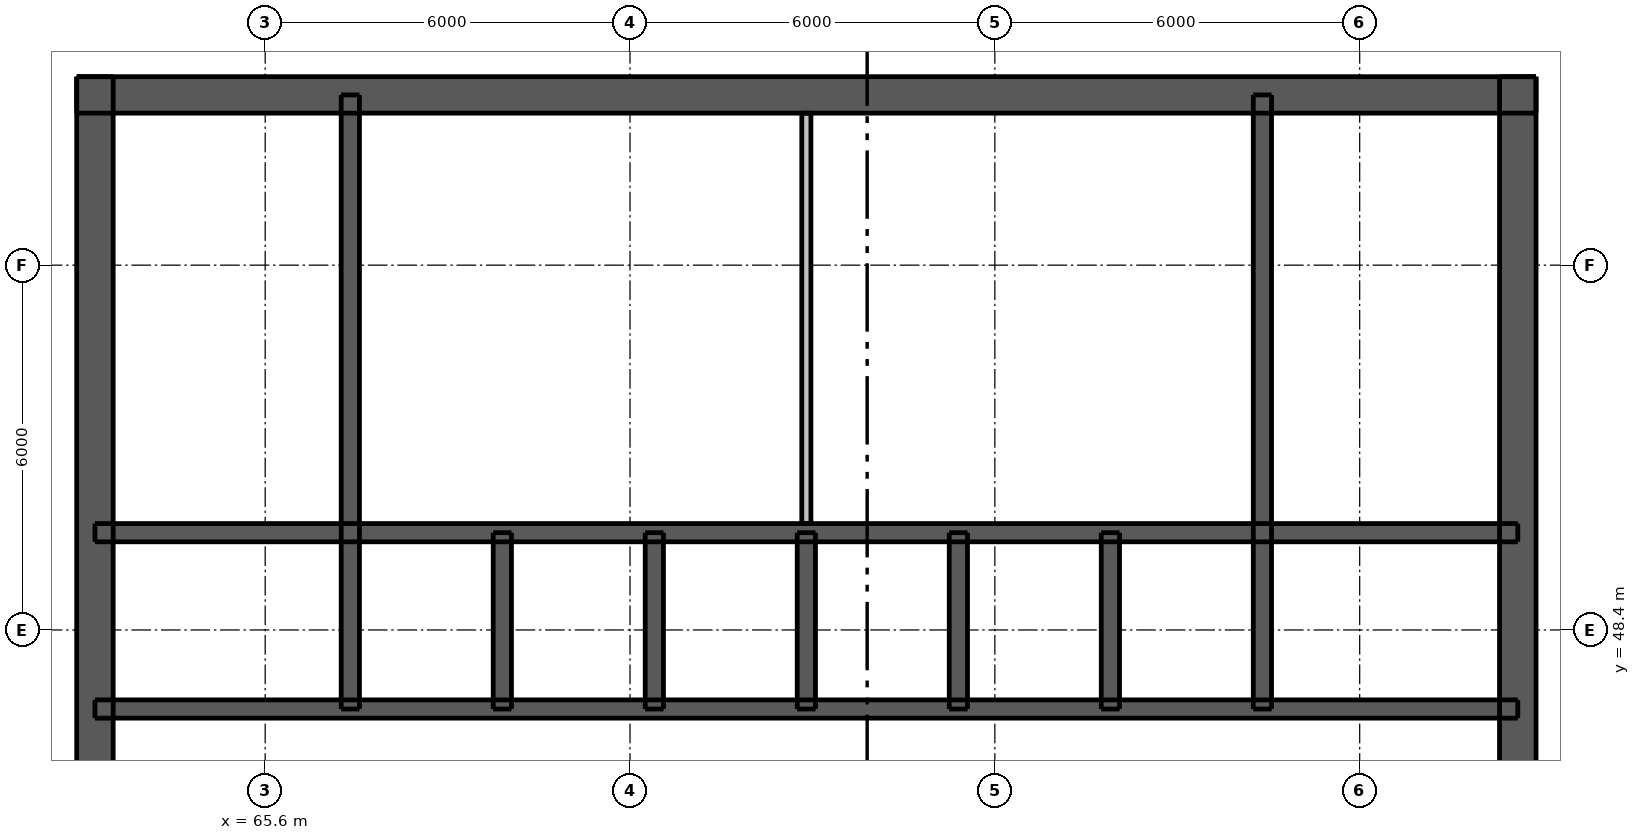
"""IFC4 building model, lengths in metres.
Left out: names, types, materials, properties, quantities, classifications, styles, units other than length and angle.
Written with IfcOpenShell. Run it as: python <this file> out.ifc"""

import sys

from ifc_helpers import new_model, si_unit, direction, frame, frame_2d, origin, place, context, subcontext, project, spatial, rectangle, extrude, element, fill, save


model = new_model("IFC4")
c1 = context("Model", 3, precision=1e-05, world=origin(), true_north=direction((0.0, 1.0)))
c2 = subcontext(c1, "Body", "Model", "MODEL_VIEW")
j1 = project(units=[si_unit("LENGTHUNIT", "METRE"), si_unit("PLANEANGLEUNIT", "RADIAN")], contexts=[c1])
p1 = place(None, origin())
s1 = spatial("IfcSite", under=j1, at=p1, CompositionType="ELEMENT")
p2 = place(p1, origin())
s2 = spatial("IfcBuilding", under=s1, at=p2, CompositionType="ELEMENT")
p3 = place(p2, frame((0.0, 0.0, 206.8)))
s3 = spatial("IfcBuildingStorey", under=s2, at=p3, CompositionType="ELEMENT", Elevation=206.8)
p4 = place(p3, frame((62.5, 57.2, 0.0), z_axis=(0.0, 0.0, 1.0), x_axis=(1.0, 0.0, 0.0)))
e1 = element("IfcWall", 1, at=p4, inside=s3, PredefinedType="SHEAR", context=c2, shape_type="SweptSolid", body=[
    extrude(rectangle(XDim=24.0, YDim=0.6, at=frame_2d((12.0, 0.0))), origin(), (0.0, 0.0, 1.0), 3.05),
])
p5 = place(p4, frame((20.975, 0.0, 0.0)))
e2 = element("IfcOpeningElement", 2, at=p5, cuts=e1, PredefinedType="OPENING", context=c2, shape_type="SweptSolid", body=[
    extrude(rectangle(XDim=1.1, YDim=2.1, at=frame_2d((0.55, 1.05))), frame((0.0, 0.31, 0.0), z_axis=(0.0, -1.0, 0.0), x_axis=(1.0, 0.0, 0.0)), (0.0, 0.0, 1.0), 0.62),
])
p6 = place(p4, frame((1.925, 0.0, 0.0)))
e3 = element("IfcOpeningElement", 3, at=p6, cuts=e1, PredefinedType="OPENING", context=c2, shape_type="SweptSolid", body=[
    extrude(rectangle(XDim=1.1, YDim=2.1, at=frame_2d((0.55, 1.05))), frame((0.0, 0.31, 0.0), z_axis=(0.0, -1.0, 0.0), x_axis=(1.0, 0.0, 0.0)), (0.0, 0.0, 1.0), 0.62),
])
p7 = place(p4, frame((7.875, 0.0, 0.0)))
e4 = element("IfcOpeningElement", 4, at=p7, cuts=e1, PredefinedType="OPENING", context=c2, shape_type="SweptSolid", body=[
    extrude(rectangle(XDim=0.9, YDim=2.1, at=frame_2d((0.45, 1.05))), frame((0.0, 0.31, 0.0), z_axis=(0.0, -1.0, 0.0), x_axis=(1.0, 0.0, 0.0)), (0.0, 0.0, 1.0), 0.62),
])
p8 = place(p4, frame((15.225, 0.0, 0.0)))
e5 = element("IfcOpeningElement", 5, at=p8, cuts=e1, PredefinedType="OPENING", context=c2, shape_type="SweptSolid", body=[
    extrude(rectangle(XDim=0.9, YDim=2.1, at=frame_2d((0.45, 1.05))), frame((0.0, 0.31, 0.0), z_axis=(0.0, -1.0, 0.0), x_axis=(1.0, 0.0, 0.0)), (0.0, 0.0, 1.0), 0.62),
])
p9 = place(p3, frame((62.8, 33.5, 0.0), z_axis=(0.0, 0.0, 1.0), x_axis=(0.0, 1.0, 0.0)))
e6 = element("IfcWall", 6, at=p9, inside=s3, PredefinedType="SHEAR", context=c2, shape_type="SweptSolid", body=[
    extrude(rectangle(XDim=24.0, YDim=0.6, at=frame_2d((12.0, 0.0))), origin(), (0.0, 0.0, 1.0), 3.05),
])
p10 = place(p9, frame((11.2, 0.0, 0.0)))
e7 = element("IfcOpeningElement", 7, at=p10, cuts=e6, PredefinedType="OPENING", context=c2, shape_type="SweptSolid", body=[
    extrude(rectangle(XDim=1.6, YDim=2.1, at=frame_2d((0.8, 1.05))), frame((0.0, 0.31, 0.0), z_axis=(0.0, -1.0, 0.0), x_axis=(1.0, 0.0, 0.0)), (0.0, 0.0, 1.0), 0.62),
])
p11 = place(p3, frame((86.2, 33.5, 0.0), z_axis=(0.0, 0.0, 1.0), x_axis=(0.0, 1.0, 0.0)))
e8 = element("IfcWall", 8, at=p11, inside=s3, PredefinedType="SHEAR", context=c2, shape_type="SweptSolid", body=[
    extrude(rectangle(XDim=24.0, YDim=0.6, at=frame_2d((12.0, 0.0))), origin(), (0.0, 0.0, 1.0), 3.05),
])
p12 = place(p11, frame((11.2, 0.0, 0.0)))
e9 = element("IfcOpeningElement", 9, at=p12, cuts=e8, PredefinedType="OPENING", context=c2, shape_type="SweptSolid", body=[
    extrude(rectangle(XDim=1.6, YDim=2.1, at=frame_2d((0.8, 1.05))), frame((0.0, 0.31, 0.0), z_axis=(0.0, -1.0, 0.0), x_axis=(1.0, 0.0, 0.0)), (0.0, 0.0, 1.0), 0.62),
])
p13 = place(p3, frame((62.8, 47.1, 0.0), z_axis=(0.0, 0.0, 1.0), x_axis=(1.0, 0.0, 0.0)))
e10 = element("IfcWall", 10, at=p13, inside=s3, PredefinedType="SHEAR", context=c2, shape_type="SweptSolid", body=[
    extrude(rectangle(XDim=23.4, YDim=0.3, at=frame_2d((11.7, 0.0))), origin(), (0.0, 0.0, 1.0), 3.05),
])
p14 = place(p13, frame((1.725, 0.0, 0.0)))
e11 = element("IfcOpeningElement", 11, at=p14, cuts=e10, PredefinedType="OPENING", context=c2, shape_type="SweptSolid", body=[
    extrude(rectangle(XDim=0.9, YDim=2.1, at=frame_2d((0.45, 1.05))), frame((0.0, 0.16, 0.0), z_axis=(0.0, -1.0, 0.0), x_axis=(1.0, 0.0, 0.0)), (0.0, 0.0, 1.0), 0.32),
])
p15 = place(p13, frame((20.775, 0.0, 0.0)))
e12 = element("IfcOpeningElement", 12, at=p15, cuts=e10, PredefinedType="OPENING", context=c2, shape_type="SweptSolid", body=[
    extrude(rectangle(XDim=0.9, YDim=2.1, at=frame_2d((0.45, 1.05))), frame((0.0, 0.16, 0.0), z_axis=(0.0, -1.0, 0.0), x_axis=(1.0, 0.0, 0.0)), (0.0, 0.0, 1.0), 0.32),
])
p16 = place(p13, frame((4.9, 0.0, 0.0)))
e13 = element("IfcOpeningElement", 13, at=p16, cuts=e10, PredefinedType="OPENING", context=c2, shape_type="SweptSolid", body=[
    extrude(rectangle(XDim=1.1, YDim=2.1, at=frame_2d((0.55, 1.05))), frame((0.0, 0.16, 0.0), z_axis=(0.0, -1.0, 0.0), x_axis=(1.0, 0.0, 0.0)), (0.0, 0.0, 1.0), 0.32),
])
p17 = place(p13, frame((7.4, 0.0, 0.0)))
e14 = element("IfcOpeningElement", 14, at=p17, cuts=e10, PredefinedType="OPENING", context=c2, shape_type="SweptSolid", body=[
    extrude(rectangle(XDim=1.1, YDim=2.1, at=frame_2d((0.55, 1.05))), frame((0.0, 0.16, 0.0), z_axis=(0.0, -1.0, 0.0), x_axis=(1.0, 0.0, 0.0)), (0.0, 0.0, 1.0), 0.32),
])
p18 = place(p13, frame((9.9, 0.0, 0.0)))
e15 = element("IfcOpeningElement", 15, at=p18, cuts=e10, PredefinedType="OPENING", context=c2, shape_type="SweptSolid", body=[
    extrude(rectangle(XDim=1.1, YDim=2.1, at=frame_2d((0.55, 1.05))), frame((0.0, 0.16, 0.0), z_axis=(0.0, -1.0, 0.0), x_axis=(1.0, 0.0, 0.0)), (0.0, 0.0, 1.0), 0.32),
])
p19 = place(p13, frame((12.4, 0.0, 0.0)))
e16 = element("IfcOpeningElement", 16, at=p19, cuts=e10, PredefinedType="OPENING", context=c2, shape_type="SweptSolid", body=[
    extrude(rectangle(XDim=1.1, YDim=2.1, at=frame_2d((0.55, 1.05))), frame((0.0, 0.16, 0.0), z_axis=(0.0, -1.0, 0.0), x_axis=(1.0, 0.0, 0.0)), (0.0, 0.0, 1.0), 0.32),
])
p20 = place(p13, frame((14.9, 0.0, 0.0)))
e17 = element("IfcOpeningElement", 17, at=p20, cuts=e10, PredefinedType="OPENING", context=c2, shape_type="SweptSolid", body=[
    extrude(rectangle(XDim=1.1, YDim=2.1, at=frame_2d((0.55, 1.05))), frame((0.0, 0.16, 0.0), z_axis=(0.0, -1.0, 0.0), x_axis=(1.0, 0.0, 0.0)), (0.0, 0.0, 1.0), 0.32),
])
p21 = place(p13, frame((17.4, 0.0, 0.0)))
e18 = element("IfcOpeningElement", 18, at=p21, cuts=e10, PredefinedType="OPENING", context=c2, shape_type="SweptSolid", body=[
    extrude(rectangle(XDim=1.1, YDim=2.1, at=frame_2d((0.55, 1.05))), frame((0.0, 0.16, 0.0), z_axis=(0.0, -1.0, 0.0), x_axis=(1.0, 0.0, 0.0)), (0.0, 0.0, 1.0), 0.32),
])
p22 = place(p3, frame((62.8, 50.0, 0.0), z_axis=(0.0, 0.0, 1.0), x_axis=(1.0, 0.0, 0.0)))
e19 = element("IfcWall", 19, at=p22, inside=s3, PredefinedType="SHEAR", context=c2, shape_type="SweptSolid", body=[
    extrude(rectangle(XDim=23.4, YDim=0.3, at=frame_2d((11.7, 0.0))), origin(), (0.0, 0.0, 1.0), 3.05),
])
for number, where, z_axis, x_axis in (
    (20, (67.0, 47.1, 0.0), (0.0, 0.0, 1.0), (0.0, 1.0, 0.0)),
    (21, (82.0, 47.1, 0.0), (0.0, 0.0, 1.0), (0.0, 1.0, 0.0)),
):
    element("IfcWall", number, at=place(p3, frame(where, z_axis=z_axis, x_axis=x_axis)), inside=s3, PredefinedType="SHEAR", context=c2, shape_type="SweptSolid", body=[
        extrude(rectangle(XDim=10.1, YDim=0.3, at=frame_2d((5.05, 0.0))), origin(), (0.0, 0.0, 1.0), 3.05),
    ])
for number, where, z_axis, x_axis in (
    (22, (69.5, 47.1, 0.0), (0.0, 0.0, 1.0), (0.0, 1.0, 0.0)),
    (23, (72.0, 47.1, 0.0), (0.0, 0.0, 1.0), (0.0, 1.0, 0.0)),
    (24, (74.5, 47.1, 0.0), (0.0, 0.0, 1.0), (0.0, 1.0, 0.0)),
    (25, (77.0, 47.1, 0.0), (0.0, 0.0, 1.0), (0.0, 1.0, 0.0)),
    (26, (79.5, 47.1, 0.0), (0.0, 0.0, 1.0), (0.0, 1.0, 0.0)),
):
    element("IfcWall", number, at=place(p3, frame(where, z_axis=z_axis, x_axis=x_axis)), inside=s3, PredefinedType="SHEAR", context=c2, shape_type="SweptSolid", body=[
        extrude(rectangle(XDim=2.9, YDim=0.3, at=frame_2d((1.45, 0.0))), origin(), (0.0, 0.0, 1.0), 3.05),
    ])
p23 = place(p3, frame((74.5, 50.15, 0.0), z_axis=(0.0, 0.0, 1.0), x_axis=(0.0, 1.0, 0.0)))
e27 = element("IfcWall", 27, at=p23, inside=s3, PredefinedType="PLUMBINGWALL", context=c2, shape_type="SweptSolid", body=[
    extrude(rectangle(XDim=6.75, YDim=0.15, at=frame_2d((3.375, 0.0))), origin(), (0.0, 0.0, 1.0), 3.05),
])
p24 = place(p5, origin())
e28 = element("IfcDoor", 28, at=p24, inside=s3, OperationType="SINGLE_SWING_RIGHT", PredefinedType="DOOR", context=c2, shape_type="SweptSolid", body=[
    extrude(rectangle(XDim=1.1, YDim=2.1, at=frame_2d((0.55, 1.05))), frame((0.0, -0.237, 0.0), z_axis=(0.0, -1.0, 0.0), x_axis=(1.0, 0.0, 0.0)), (0.0, 0.0, 1.0), 0.05),
])
fill(e2, e28)
p25 = place(p6, origin())
e29 = element("IfcDoor", 29, at=p25, inside=s3, OperationType="SINGLE_SWING_LEFT", PredefinedType="DOOR", context=c2, shape_type="SweptSolid", body=[
    extrude(rectangle(XDim=1.1, YDim=2.1, at=frame_2d((0.55, 1.05))), frame((0.0, -0.237, 0.0), z_axis=(0.0, -1.0, 0.0), x_axis=(1.0, 0.0, 0.0)), (0.0, 0.0, 1.0), 0.05),
])
fill(e3, e29)
p26 = place(p10, origin())
e30 = element("IfcDoor", 30, at=p26, inside=s3, OperationType="DOUBLE_DOOR_SINGLE_SWING", PredefinedType="DOOR", context=c2, shape_type="SweptSolid", body=[
    extrude(rectangle(XDim=1.6, YDim=2.1, at=frame_2d((0.8, 1.05))), frame((0.0, -0.237, 0.0), z_axis=(0.0, -1.0, 0.0), x_axis=(1.0, 0.0, 0.0)), (0.0, 0.0, 1.0), 0.05),
])
fill(e7, e30)
p27 = place(p12, origin())
e31 = element("IfcDoor", 31, at=p27, inside=s3, OperationType="DOUBLE_DOOR_SINGLE_SWING", PredefinedType="DOOR", context=c2, shape_type="SweptSolid", body=[
    extrude(rectangle(XDim=1.6, YDim=2.1, at=frame_2d((0.8, 1.05))), frame((0.0, 0.288, 0.0), z_axis=(0.0, -1.0, 0.0), x_axis=(1.0, 0.0, 0.0)), (0.0, 0.0, 1.0), 0.05),
])
fill(e9, e31)
p28 = place(p14, origin())
e32 = element("IfcDoor", 32, at=p28, inside=s3, OperationType="SINGLE_SWING_LEFT", PredefinedType="DOOR", context=c2, shape_type="SweptSolid", body=[
    extrude(rectangle(XDim=0.9, YDim=2.1, at=frame_2d((0.45, 1.05))), frame((0.0, 0.138, 0.0), z_axis=(0.0, -1.0, 0.0), x_axis=(1.0, 0.0, 0.0)), (0.0, 0.0, 1.0), 0.05),
])
fill(e11, e32)
p29 = place(p15, origin())
e33 = element("IfcDoor", 33, at=p29, inside=s3, OperationType="SINGLE_SWING_LEFT", PredefinedType="DOOR", context=c2, shape_type="SweptSolid", body=[
    extrude(rectangle(XDim=0.9, YDim=2.1, at=frame_2d((0.45, 1.05))), frame((0.0, 0.138, 0.0), z_axis=(0.0, -1.0, 0.0), x_axis=(1.0, 0.0, 0.0)), (0.0, 0.0, 1.0), 0.05),
])
fill(e12, e33)
p30 = place(p7, origin())
e34 = element("IfcDoor", 34, at=p30, inside=s3, OperationType="SINGLE_SWING_RIGHT", PredefinedType="DOOR", context=c2, shape_type="SweptSolid", body=[
    extrude(rectangle(XDim=0.9, YDim=2.1, at=frame_2d((0.45, 1.05))), frame((0.0, -0.237, 0.0), z_axis=(0.0, -1.0, 0.0), x_axis=(1.0, 0.0, 0.0)), (0.0, 0.0, 1.0), 0.05),
])
fill(e4, e34)
p31 = place(p8, origin())
e35 = element("IfcDoor", 35, at=p31, inside=s3, OperationType="SINGLE_SWING_RIGHT", PredefinedType="DOOR", context=c2, shape_type="SweptSolid", body=[
    extrude(rectangle(XDim=0.9, YDim=2.1, at=frame_2d((0.45, 1.05))), frame((0.0, -0.237, 0.0), z_axis=(0.0, -1.0, 0.0), x_axis=(1.0, 0.0, 0.0)), (0.0, 0.0, 1.0), 0.05),
])
fill(e5, e35)
p32 = place(p16, origin())
e36 = element("IfcDoor", 36, at=p32, inside=s3, OperationType="DOUBLE_DOOR_SLIDING", PredefinedType="DOOR", context=c2, shape_type="SweptSolid", body=[
    extrude(rectangle(XDim=1.1, YDim=2.1, at=frame_2d((0.55, 1.05))), frame((0.0, 0.025, 0.0), z_axis=(0.0, -1.0, 0.0), x_axis=(1.0, 0.0, 0.0)), (0.0, 0.0, 1.0), 0.05),
])
fill(e13, e36)
p33 = place(p17, origin())
e37 = element("IfcDoor", 37, at=p33, inside=s3, OperationType="DOUBLE_DOOR_SLIDING", PredefinedType="DOOR", context=c2, shape_type="SweptSolid", body=[
    extrude(rectangle(XDim=1.1, YDim=2.1, at=frame_2d((0.55, 1.05))), frame((0.0, 0.025, 0.0), z_axis=(0.0, -1.0, 0.0), x_axis=(1.0, 0.0, 0.0)), (0.0, 0.0, 1.0), 0.05),
])
fill(e14, e37)
p34 = place(p18, origin())
e38 = element("IfcDoor", 38, at=p34, inside=s3, OperationType="DOUBLE_DOOR_SLIDING", PredefinedType="DOOR", context=c2, shape_type="SweptSolid", body=[
    extrude(rectangle(XDim=1.1, YDim=2.1, at=frame_2d((0.55, 1.05))), frame((0.0, 0.025, 0.0), z_axis=(0.0, -1.0, 0.0), x_axis=(1.0, 0.0, 0.0)), (0.0, 0.0, 1.0), 0.05),
])
fill(e15, e38)
p35 = place(p19, origin())
e39 = element("IfcDoor", 39, at=p35, inside=s3, OperationType="DOUBLE_DOOR_SLIDING", PredefinedType="DOOR", context=c2, shape_type="SweptSolid", body=[
    extrude(rectangle(XDim=1.1, YDim=2.1, at=frame_2d((0.55, 1.05))), frame((0.0, 0.025, 0.0), z_axis=(0.0, -1.0, 0.0), x_axis=(1.0, 0.0, 0.0)), (0.0, 0.0, 1.0), 0.05),
])
fill(e16, e39)
p36 = place(p20, origin())
e40 = element("IfcDoor", 40, at=p36, inside=s3, OperationType="DOUBLE_DOOR_SLIDING", PredefinedType="DOOR", context=c2, shape_type="SweptSolid", body=[
    extrude(rectangle(XDim=1.1, YDim=2.1, at=frame_2d((0.55, 1.05))), frame((0.0, 0.025, 0.0), z_axis=(0.0, -1.0, 0.0), x_axis=(1.0, 0.0, 0.0)), (0.0, 0.0, 1.0), 0.05),
])
fill(e17, e40)
p37 = place(p21, origin())
e41 = element("IfcDoor", 41, at=p37, inside=s3, OperationType="DOUBLE_DOOR_SLIDING", PredefinedType="DOOR", context=c2, shape_type="SweptSolid", body=[
    extrude(rectangle(XDim=1.1, YDim=2.1, at=frame_2d((0.55, 1.05))), frame((0.0, 0.025, 0.0), z_axis=(0.0, -1.0, 0.0), x_axis=(1.0, 0.0, 0.0)), (0.0, 0.0, 1.0), 0.05),
])
fill(e18, e41)
save(model, sys.argv[1])
